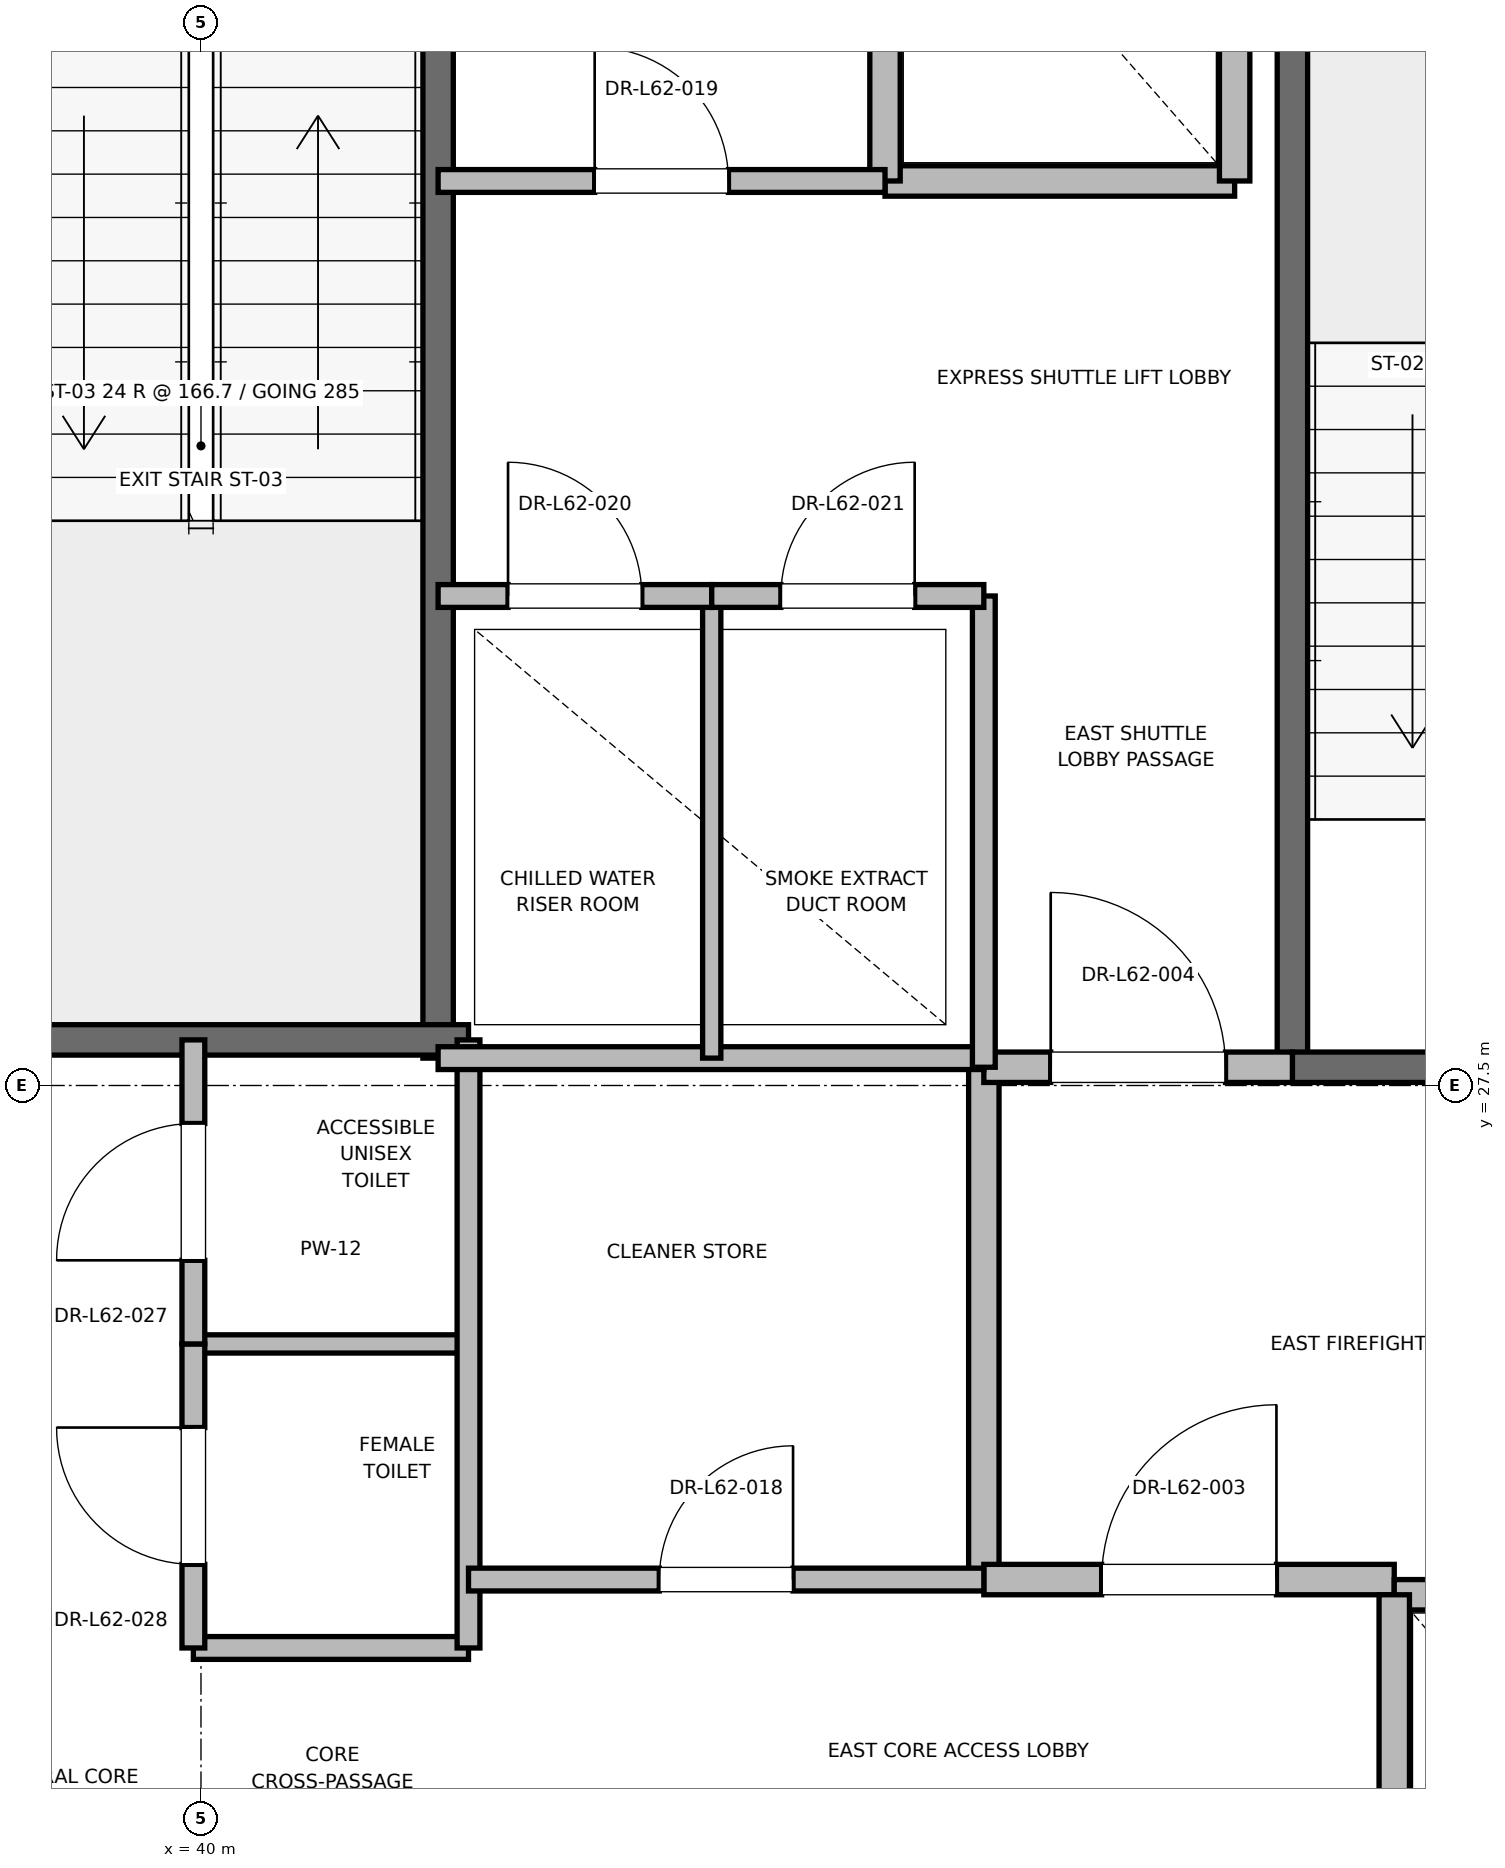
"""IFC4 building model, lengths in metres.
Left out: names, types, materials, properties, quantities, classifications, styles, units other than length and angle.
Written with IfcOpenShell. Run it as: python <this file> out.ifc"""

import sys

from ifc_helpers import new_model, si_unit, direction, frame, frame_2d, origin, place, context, subcontext, project, spatial, rectangle, extrude, element, fill, save


model = new_model("IFC4")
c1 = context("Model", 3, precision=1e-05, world=origin(), true_north=direction((0.0, 1.0)))
c2 = subcontext(c1, "Body", "Model", "MODEL_VIEW")
j1 = project(units=[si_unit("LENGTHUNIT", "METRE"), si_unit("PLANEANGLEUNIT", "RADIAN")], contexts=[c1])
p1 = place(None, origin())
s1 = spatial("IfcSite", under=j1, at=p1, CompositionType="ELEMENT")
p2 = place(p1, origin())
s2 = spatial("IfcBuilding", under=s1, at=p2, CompositionType="ELEMENT")
p3 = place(p2, frame((0.0, 0.0, 267.2)))
s3 = spatial("IfcBuildingStorey", under=s2, at=p3, CompositionType="ELEMENT", Elevation=267.2)
p4 = place(p3, frame((47.18, 27.62, 0.0), z_axis=(0.0, 0.0, 1.0), x_axis=(0.0, 1.0, 0.0)))
e1 = element("IfcWall", 1, at=p4, inside=s3, PredefinedType="SOLIDWALL", context=c2, shape_type="SweptSolid", body=[
    extrude(rectangle(XDim=8.18, YDim=0.2, at=frame_2d((4.09, 0.0))), origin(), (0.0, 0.0, 1.0), 3.785),
])
p5 = place(p3, frame((47.18, 27.62, 0.0), z_axis=(0.0, 0.0, 1.0), x_axis=(1.0, 0.0, 0.0)))
e2 = element("IfcWall", 2, at=p5, inside=s3, PredefinedType="SOLIDWALL", context=c2, shape_type="SweptSolid", body=[
    extrude(rectangle(XDim=3.12, YDim=0.2, at=frame_2d((1.56, 0.0))), origin(), (0.0, 0.0, 1.0), 3.785),
])
p6 = place(p5, frame((1.01, 0.0, 0.0)))
e3 = element("IfcOpeningElement", 3, at=p6, cuts=e2, PredefinedType="OPENING", context=c2, shape_type="SweptSolid", body=[
    extrude(rectangle(XDim=1.1, YDim=2.15, at=frame_2d((0.55, 1.075))), frame((0.0, 0.1, 0.0), z_axis=(0.0, -1.0, 0.0), x_axis=(1.0, 0.0, 0.0)), (0.0, 0.0, 1.0), 0.2),
])
p7 = place(p3, frame((41.56, 27.68, 0.0), z_axis=(0.0, 0.0, 1.0), x_axis=(0.0, 1.0, 0.0)))
e4 = element("IfcWall", 4, at=p7, inside=s3, PredefinedType="SOLIDWALL", context=c2, shape_type="SweptSolid", body=[
    extrude(rectangle(XDim=8.57, YDim=0.2, at=frame_2d((4.285, 0.0))), origin(), (0.0, 0.0, 1.0), 3.785),
])
p8 = place(p3, frame((38.44, 27.8, 0.0), z_axis=(0.0, 0.0, 1.0), x_axis=(1.0, 0.0, 0.0)))
e5 = element("IfcWall", 5, at=p8, inside=s3, PredefinedType="SOLIDWALL", context=c2, shape_type="SweptSolid", body=[
    extrude(rectangle(XDim=3.32, YDim=0.2, at=frame_2d((1.66, 0.0))), origin(), (0.0, 0.0, 1.0), 3.785),
])
p9 = place(p3, frame((45.15, 24.25, 0.0), z_axis=(0.0, 0.0, 1.0), x_axis=(0.0, 1.0, 0.0)))
e6 = element("IfcWall", 6, at=p9, inside=s3, PredefinedType="PARTITIONING", context=c2, shape_type="SweptSolid", body=[
    extrude(rectangle(XDim=3.37, YDim=0.2, at=frame_2d((1.685, 0.0))), origin(), (0.0, 0.0, 1.0), 3.785),
])
p10 = place(p3, frame((45.15, 24.25, 0.0), z_axis=(0.0, 0.0, 1.0), x_axis=(1.0, 0.0, 0.0)))
e7 = element("IfcWall", 7, at=p10, inside=s3, PredefinedType="PARTITIONING", context=c2, shape_type="SweptSolid", body=[
    extrude(rectangle(XDim=2.7, YDim=0.2, at=frame_2d((1.35, 0.0))), origin(), (0.0, 0.0, 1.0), 3.785),
])
p11 = place(p10, frame((0.775, 0.0, 0.0)))
e8 = element("IfcOpeningElement", 8, at=p11, cuts=e7, PredefinedType="OPENING", context=c2, shape_type="SweptSolid", body=[
    extrude(rectangle(XDim=1.15, YDim=2.2, at=frame_2d((0.575, 1.1))), frame((0.0, 0.1, 0.0), z_axis=(0.0, -1.0, 0.0), x_axis=(1.0, 0.0, 0.0)), (0.0, 0.0, 1.0), 0.2),
])
p12 = place(p3, frame((45.15, 27.62, 0.0), z_axis=(0.0, 0.0, 1.0), x_axis=(1.0, 0.0, 0.0)))
e9 = element("IfcWall", 9, at=p12, inside=s3, PredefinedType="PARTITIONING", context=c2, shape_type="SweptSolid", body=[
    extrude(rectangle(XDim=2.03, YDim=0.2, at=frame_2d((1.015, 0.0))), origin(), (0.0, 0.0, 1.0), 3.785),
])
p13 = place(p12, frame((0.44, 0.0, 0.0)))
e10 = element("IfcOpeningElement", 10, at=p13, cuts=e9, PredefinedType="OPENING", context=c2, shape_type="SweptSolid", body=[
    extrude(rectangle(XDim=1.15, YDim=2.2, at=frame_2d((0.575, 1.1))), frame((0.0, 0.1, 0.0), z_axis=(0.0, -1.0, 0.0), x_axis=(1.0, 0.0, 0.0)), (0.0, 0.0, 1.0), 0.2),
])
p14 = place(p3, frame((50.45, 24.15, 0.0), z_axis=(0.0, 0.0, 1.0), x_axis=(-1.0, 0.0, 0.0)))
e11 = element("IfcWall", 11, at=p14, inside=s3, PredefinedType="SOLIDWALL", context=c2, shape_type="SweptSolid", body=[
    extrude(rectangle(XDim=2.6, YDim=0.2, at=frame_2d((1.3, 0.0))), origin(), (0.0, 0.0, 1.0), 2.865),
])
p15 = place(p14, frame((0.75, 0.0, 0.0)))
e12 = element("IfcOpeningElement", 12, at=p15, cuts=e11, PredefinedType="OPENING", context=c2, shape_type="SweptSolid", body=[
    extrude(rectangle(XDim=1.1, YDim=2.2, at=frame_2d((0.55, 1.1))), frame((0.0, 0.1, 0.0), z_axis=(0.0, -1.0, 0.0), x_axis=(1.0, 0.0, 0.0)), (0.0, 0.0, 1.0), 0.2),
])
p16 = place(p3, frame((47.85, 24.15, 0.0), z_axis=(0.0, 0.0, 1.0), x_axis=(0.0, -1.0, 0.0)))
e13 = element("IfcWall", 13, at=p16, inside=s3, PredefinedType="SOLIDWALL", context=c2, shape_type="SweptSolid", body=[
    extrude(rectangle(XDim=3.0, YDim=0.2, at=frame_2d((1.5, 0.0))), origin(), (0.0, 0.0, 1.0), 3.785),
])
p17 = place(p3, frame((44.5, 33.45, 0.0), z_axis=(0.0, 0.0, 1.0), x_axis=(1.0, 0.0, 0.0)))
e14 = element("IfcWall", 14, at=p17, inside=s3, PredefinedType="SOLIDWALL", context=c2, shape_type="SweptSolid", body=[
    extrude(rectangle(XDim=2.3, YDim=0.2, at=frame_2d((1.15, 0.0))), origin(), (0.0, 0.0, 1.0), 3.785),
])
p18 = place(p3, frame((44.5, 36.05, 0.0), z_axis=(0.0, 0.0, 1.0), x_axis=(0.0, -1.0, 0.0)))
e15 = element("IfcWall", 15, at=p18, inside=s3, PredefinedType="SOLIDWALL", context=c2, shape_type="SweptSolid", body=[
    extrude(rectangle(XDim=2.6, YDim=0.2, at=frame_2d((1.3, 0.0))), origin(), (0.0, 0.0, 1.0), 2.865),
])
p19 = place(p3, frame((46.8, 33.45, 0.0), z_axis=(0.0, 0.0, 1.0), x_axis=(0.0, 1.0, 0.0)))
e16 = element("IfcWall", 16, at=p19, inside=s3, PredefinedType="SOLIDWALL", context=c2, shape_type="SweptSolid", body=[
    extrude(rectangle(XDim=2.6, YDim=0.2, at=frame_2d((1.3, 0.0))), origin(), (0.0, 0.0, 1.0), 3.785),
])
p20 = place(p3, frame((39.95, 23.8, 0.0), z_axis=(0.0, 0.0, 1.0), x_axis=(1.0, 0.0, 0.0)))
e17 = element("IfcWall", 17, at=p20, inside=s3, PredefinedType="PARTITIONING", context=c2, shape_type="SweptSolid", body=[
    extrude(rectangle(XDim=1.81, YDim=0.15, at=frame_2d((0.905, 0.0))), origin(), (0.0, 0.0, 1.0), 2.85),
])
p21 = place(p3, frame((39.95, 25.8, 0.0), z_axis=(0.0, 0.0, 1.0), x_axis=(1.0, 0.0, 0.0)))
e18 = element("IfcWall", 18, at=p21, inside=s3, PredefinedType="PARTITIONING", context=c2, shape_type="SweptSolid", body=[
    extrude(rectangle(XDim=1.81, YDim=0.12, at=frame_2d((0.905, 0.0))), origin(), (0.0, 0.0, 1.0), 2.85),
])
p22 = place(p3, frame((41.76, 23.8, 0.0), z_axis=(0.0, 0.0, 1.0), x_axis=(0.0, 1.0, 0.0)))
e19 = element("IfcWall", 19, at=p22, inside=s3, PredefinedType="PARTITIONING", context=c2, shape_type="SweptSolid", body=[
    extrude(rectangle(XDim=4.0, YDim=0.15, at=frame_2d((2.0, 0.0))), origin(), (0.0, 0.0, 1.0), 2.85),
])
p23 = place(p3, frame((39.95, 23.8, 0.0), z_axis=(0.0, 0.0, 1.0), x_axis=(0.0, 1.0, 0.0)))
e20 = element("IfcWall", 20, at=p23, inside=s3, PredefinedType="PARTITIONING", context=c2, shape_type="SweptSolid", body=[
    extrude(rectangle(XDim=2.0, YDim=0.15, at=frame_2d((1.0, 0.0))), origin(), (0.0, 0.0, 1.0), 2.85),
])
p24 = place(p23, frame((0.55, 0.0, 0.0)))
e21 = element("IfcOpeningElement", 21, at=p24, cuts=e20, PredefinedType="OPENING", context=c2, shape_type="SweptSolid", body=[
    extrude(rectangle(XDim=0.9, YDim=2.1, at=frame_2d((0.45, 1.05))), frame((0.0, 0.075, 0.0), z_axis=(0.0, -1.0, 0.0), x_axis=(1.0, 0.0, 0.0)), (0.0, 0.0, 1.0), 0.15),
])
p25 = place(p3, frame((39.95, 25.8, 0.0), z_axis=(0.0, 0.0, 1.0), x_axis=(0.0, 1.0, 0.0)))
e22 = element("IfcWall", 22, at=p25, inside=s3, PredefinedType="PARTITIONING", context=c2, shape_type="SweptSolid", body=[
    extrude(rectangle(XDim=2.0, YDim=0.15, at=frame_2d((1.0, 0.0))), origin(), (0.0, 0.0, 1.0), 2.85),
])
p26 = place(p25, frame((0.55, 0.0, 0.0)))
e23 = element("IfcOpeningElement", 23, at=p26, cuts=e22, PredefinedType="OPENING", context=c2, shape_type="SweptSolid", body=[
    extrude(rectangle(XDim=0.9, YDim=2.1, at=frame_2d((0.45, 1.05))), frame((0.0, 0.075, 0.0), z_axis=(0.0, -1.0, 0.0), x_axis=(1.0, 0.0, 0.0)), (0.0, 0.0, 1.0), 0.15),
])
p27 = place(p3, frame((41.56, 27.68, 0.0), z_axis=(0.0, 0.0, 1.0), x_axis=(1.0, 0.0, 0.0)))
e24 = element("IfcWall", 24, at=p27, inside=s3, PredefinedType="PARTITIONING", context=c2, shape_type="SweptSolid", body=[
    extrude(rectangle(XDim=3.59, YDim=0.15, at=frame_2d((1.795, 0.0))), origin(), (0.0, 0.0, 1.0), 2.85),
])
p28 = place(p3, frame((41.76, 24.25, 0.0), z_axis=(0.0, 0.0, 1.0), x_axis=(1.0, 0.0, 0.0)))
e25 = element("IfcWall", 25, at=p28, inside=s3, PredefinedType="PARTITIONING", context=c2, shape_type="SweptSolid", body=[
    extrude(rectangle(XDim=3.39, YDim=0.15, at=frame_2d((1.695, 0.0))), origin(), (0.0, 0.0, 1.0), 2.85),
])
p29 = place(p28, frame((1.255, 0.0, 0.0)))
e26 = element("IfcOpeningElement", 26, at=p29, cuts=e25, PredefinedType="OPENING", context=c2, shape_type="SweptSolid", body=[
    extrude(rectangle(XDim=0.88, YDim=2.1, at=frame_2d((0.44, 1.05))), frame((0.0, 0.075, 0.0), z_axis=(0.0, -1.0, 0.0), x_axis=(1.0, 0.0, 0.0)), (0.0, 0.0, 1.0), 0.15),
])
p30 = place(p3, frame((45.15, 27.62, 0.0), z_axis=(0.0, 0.0, 1.0), x_axis=(0.0, 1.0, 0.0)))
e27 = element("IfcWall", 27, at=p30, inside=s3, PredefinedType="PARTITIONING", context=c2, shape_type="SweptSolid", body=[
    extrude(rectangle(XDim=3.1, YDim=0.15, at=frame_2d((1.55, 0.0))), origin(), (0.0, 0.0, 1.0), 2.85),
])
p31 = place(p3, frame((43.36, 27.68, 0.0), z_axis=(0.0, 0.0, 1.0), x_axis=(0.0, 1.0, 0.0)))
e28 = element("IfcWall", 28, at=p31, inside=s3, PredefinedType="PARTITIONING", context=c2, shape_type="SweptSolid", body=[
    extrude(rectangle(XDim=3.04, YDim=0.12, at=frame_2d((1.52, 0.0))), origin(), (0.0, 0.0, 1.0), 2.85),
])
p32 = place(p3, frame((41.56, 30.72, 0.0), z_axis=(0.0, 0.0, 1.0), x_axis=(1.0, 0.0, 0.0)))
e29 = element("IfcWall", 29, at=p32, inside=s3, PredefinedType="PARTITIONING", context=c2, shape_type="SweptSolid", body=[
    extrude(rectangle(XDim=1.8, YDim=0.15, at=frame_2d((0.9, 0.0))), origin(), (0.0, 0.0, 1.0), 2.85),
])
p33 = place(p32, frame((0.46, 0.0, 0.0)))
e30 = element("IfcOpeningElement", 30, at=p33, cuts=e29, PredefinedType="OPENING", context=c2, shape_type="SweptSolid", body=[
    extrude(rectangle(XDim=0.88, YDim=2.1, at=frame_2d((0.44, 1.05))), frame((0.0, 0.075, 0.0), z_axis=(0.0, -1.0, 0.0), x_axis=(1.0, 0.0, 0.0)), (0.0, 0.0, 1.0), 0.15),
])
p34 = place(p3, frame((43.36, 30.72, 0.0), z_axis=(0.0, 0.0, 1.0), x_axis=(1.0, 0.0, 0.0)))
e31 = element("IfcWall", 31, at=p34, inside=s3, PredefinedType="PARTITIONING", context=c2, shape_type="SweptSolid", body=[
    extrude(rectangle(XDim=1.79, YDim=0.15, at=frame_2d((0.895, 0.0))), origin(), (0.0, 0.0, 1.0), 2.85),
])
p35 = place(p34, frame((0.455, 0.0, 0.0)))
e32 = element("IfcOpeningElement", 32, at=p35, cuts=e31, PredefinedType="OPENING", context=c2, shape_type="SweptSolid", body=[
    extrude(rectangle(XDim=0.88, YDim=2.1, at=frame_2d((0.44, 1.05))), frame((0.0, 0.075, 0.0), z_axis=(0.0, -1.0, 0.0), x_axis=(1.0, 0.0, 0.0)), (0.0, 0.0, 1.0), 0.15),
])
p36 = place(p3, frame((41.56, 33.45, 0.0), z_axis=(0.0, 0.0, 1.0), x_axis=(1.0, 0.0, 0.0)))
e33 = element("IfcWall", 33, at=p36, inside=s3, PredefinedType="PARTITIONING", context=c2, shape_type="SweptSolid", body=[
    extrude(rectangle(XDim=2.94, YDim=0.15, at=frame_2d((1.47, 0.0))), origin(), (0.0, 0.0, 1.0), 2.85),
])
p37 = place(p36, frame((1.03, 0.0, 0.0)))
e34 = element("IfcOpeningElement", 34, at=p37, cuts=e33, PredefinedType="OPENING", context=c2, shape_type="SweptSolid", body=[
    extrude(rectangle(XDim=0.88, YDim=2.1, at=frame_2d((0.44, 1.05))), frame((0.0, 0.075, 0.0), z_axis=(0.0, -1.0, 0.0), x_axis=(1.0, 0.0, 0.0)), (0.0, 0.0, 1.0), 0.15),
])
p38 = place(p11, origin())
e35 = element("IfcDoor", 35, at=p38, inside=s3, OperationType="SINGLE_SWING_RIGHT", PredefinedType="DOOR", context=c2, shape_type="SweptSolid", body=[
    extrude(rectangle(XDim=1.15, YDim=2.2, at=frame_2d((0.575, 1.1))), frame((0.0, 0.025, 0.0), z_axis=(0.0, -1.0, 0.0), x_axis=(1.0, 0.0, 0.0)), (0.0, 0.0, 1.0), 0.05),
])
fill(e8, e35)
p39 = place(p13, origin())
e36 = element("IfcDoor", 36, at=p39, inside=s3, OperationType="SINGLE_SWING_LEFT", PredefinedType="DOOR", context=c2, shape_type="SweptSolid", body=[
    extrude(rectangle(XDim=1.15, YDim=2.2, at=frame_2d((0.575, 1.1))), frame((0.0, 0.025, 0.0), z_axis=(0.0, -1.0, 0.0), x_axis=(1.0, 0.0, 0.0)), (0.0, 0.0, 1.0), 0.05),
])
fill(e10, e36)
p40 = place(p24, origin())
e37 = element("IfcDoor", 37, at=p40, inside=s3, OperationType="SINGLE_SWING_RIGHT", PredefinedType="DOOR", context=c2, shape_type="SweptSolid", body=[
    extrude(rectangle(XDim=0.9, YDim=2.1, at=frame_2d((0.45, 1.05))), frame((0.0, 0.025, 0.0), z_axis=(0.0, -1.0, 0.0), x_axis=(1.0, 0.0, 0.0)), (0.0, 0.0, 1.0), 0.05),
])
fill(e21, e37)
p41 = place(p26, origin())
e38 = element("IfcDoor", 38, at=p41, inside=s3, OperationType="SINGLE_SWING_LEFT", PredefinedType="DOOR", context=c2, shape_type="SweptSolid", body=[
    extrude(rectangle(XDim=0.9, YDim=2.1, at=frame_2d((0.45, 1.05))), frame((0.0, 0.025, 0.0), z_axis=(0.0, -1.0, 0.0), x_axis=(1.0, 0.0, 0.0)), (0.0, 0.0, 1.0), 0.05),
])
fill(e23, e38)
p42 = place(p29, origin())
e39 = element("IfcDoor", 39, at=p42, inside=s3, OperationType="SINGLE_SWING_RIGHT", PredefinedType="DOOR", context=c2, shape_type="SweptSolid", body=[
    extrude(rectangle(XDim=0.88, YDim=2.1, at=frame_2d((0.44, 1.05))), frame((0.0, 0.025, 0.0), z_axis=(0.0, -1.0, 0.0), x_axis=(1.0, 0.0, 0.0)), (0.0, 0.0, 1.0), 0.05),
])
fill(e26, e39)
p43 = place(p33, origin())
e40 = element("IfcDoor", 40, at=p43, inside=s3, OperationType="SINGLE_SWING_LEFT", PredefinedType="DOOR", context=c2, shape_type="SweptSolid", body=[
    extrude(rectangle(XDim=0.88, YDim=2.1, at=frame_2d((0.44, 1.05))), frame((0.0, 0.025, 0.0), z_axis=(0.0, -1.0, 0.0), x_axis=(1.0, 0.0, 0.0)), (0.0, 0.0, 1.0), 0.05),
])
fill(e30, e40)
p44 = place(p35, origin())
e41 = element("IfcDoor", 41, at=p44, inside=s3, OperationType="SINGLE_SWING_RIGHT", PredefinedType="DOOR", context=c2, shape_type="SweptSolid", body=[
    extrude(rectangle(XDim=0.88, YDim=2.1, at=frame_2d((0.44, 1.05))), frame((0.0, 0.025, 0.0), z_axis=(0.0, -1.0, 0.0), x_axis=(1.0, 0.0, 0.0)), (0.0, 0.0, 1.0), 0.05),
])
fill(e32, e41)
p45 = place(p37, origin())
e42 = element("IfcDoor", 42, at=p45, inside=s3, OperationType="SINGLE_SWING_LEFT", PredefinedType="DOOR", context=c2, shape_type="SweptSolid", body=[
    extrude(rectangle(XDim=0.88, YDim=2.1, at=frame_2d((0.44, 1.05))), frame((0.0, 0.025, 0.0), z_axis=(0.0, -1.0, 0.0), x_axis=(1.0, 0.0, 0.0)), (0.0, 0.0, 1.0), 0.05),
])
fill(e34, e42)
save(model, sys.argv[1])
